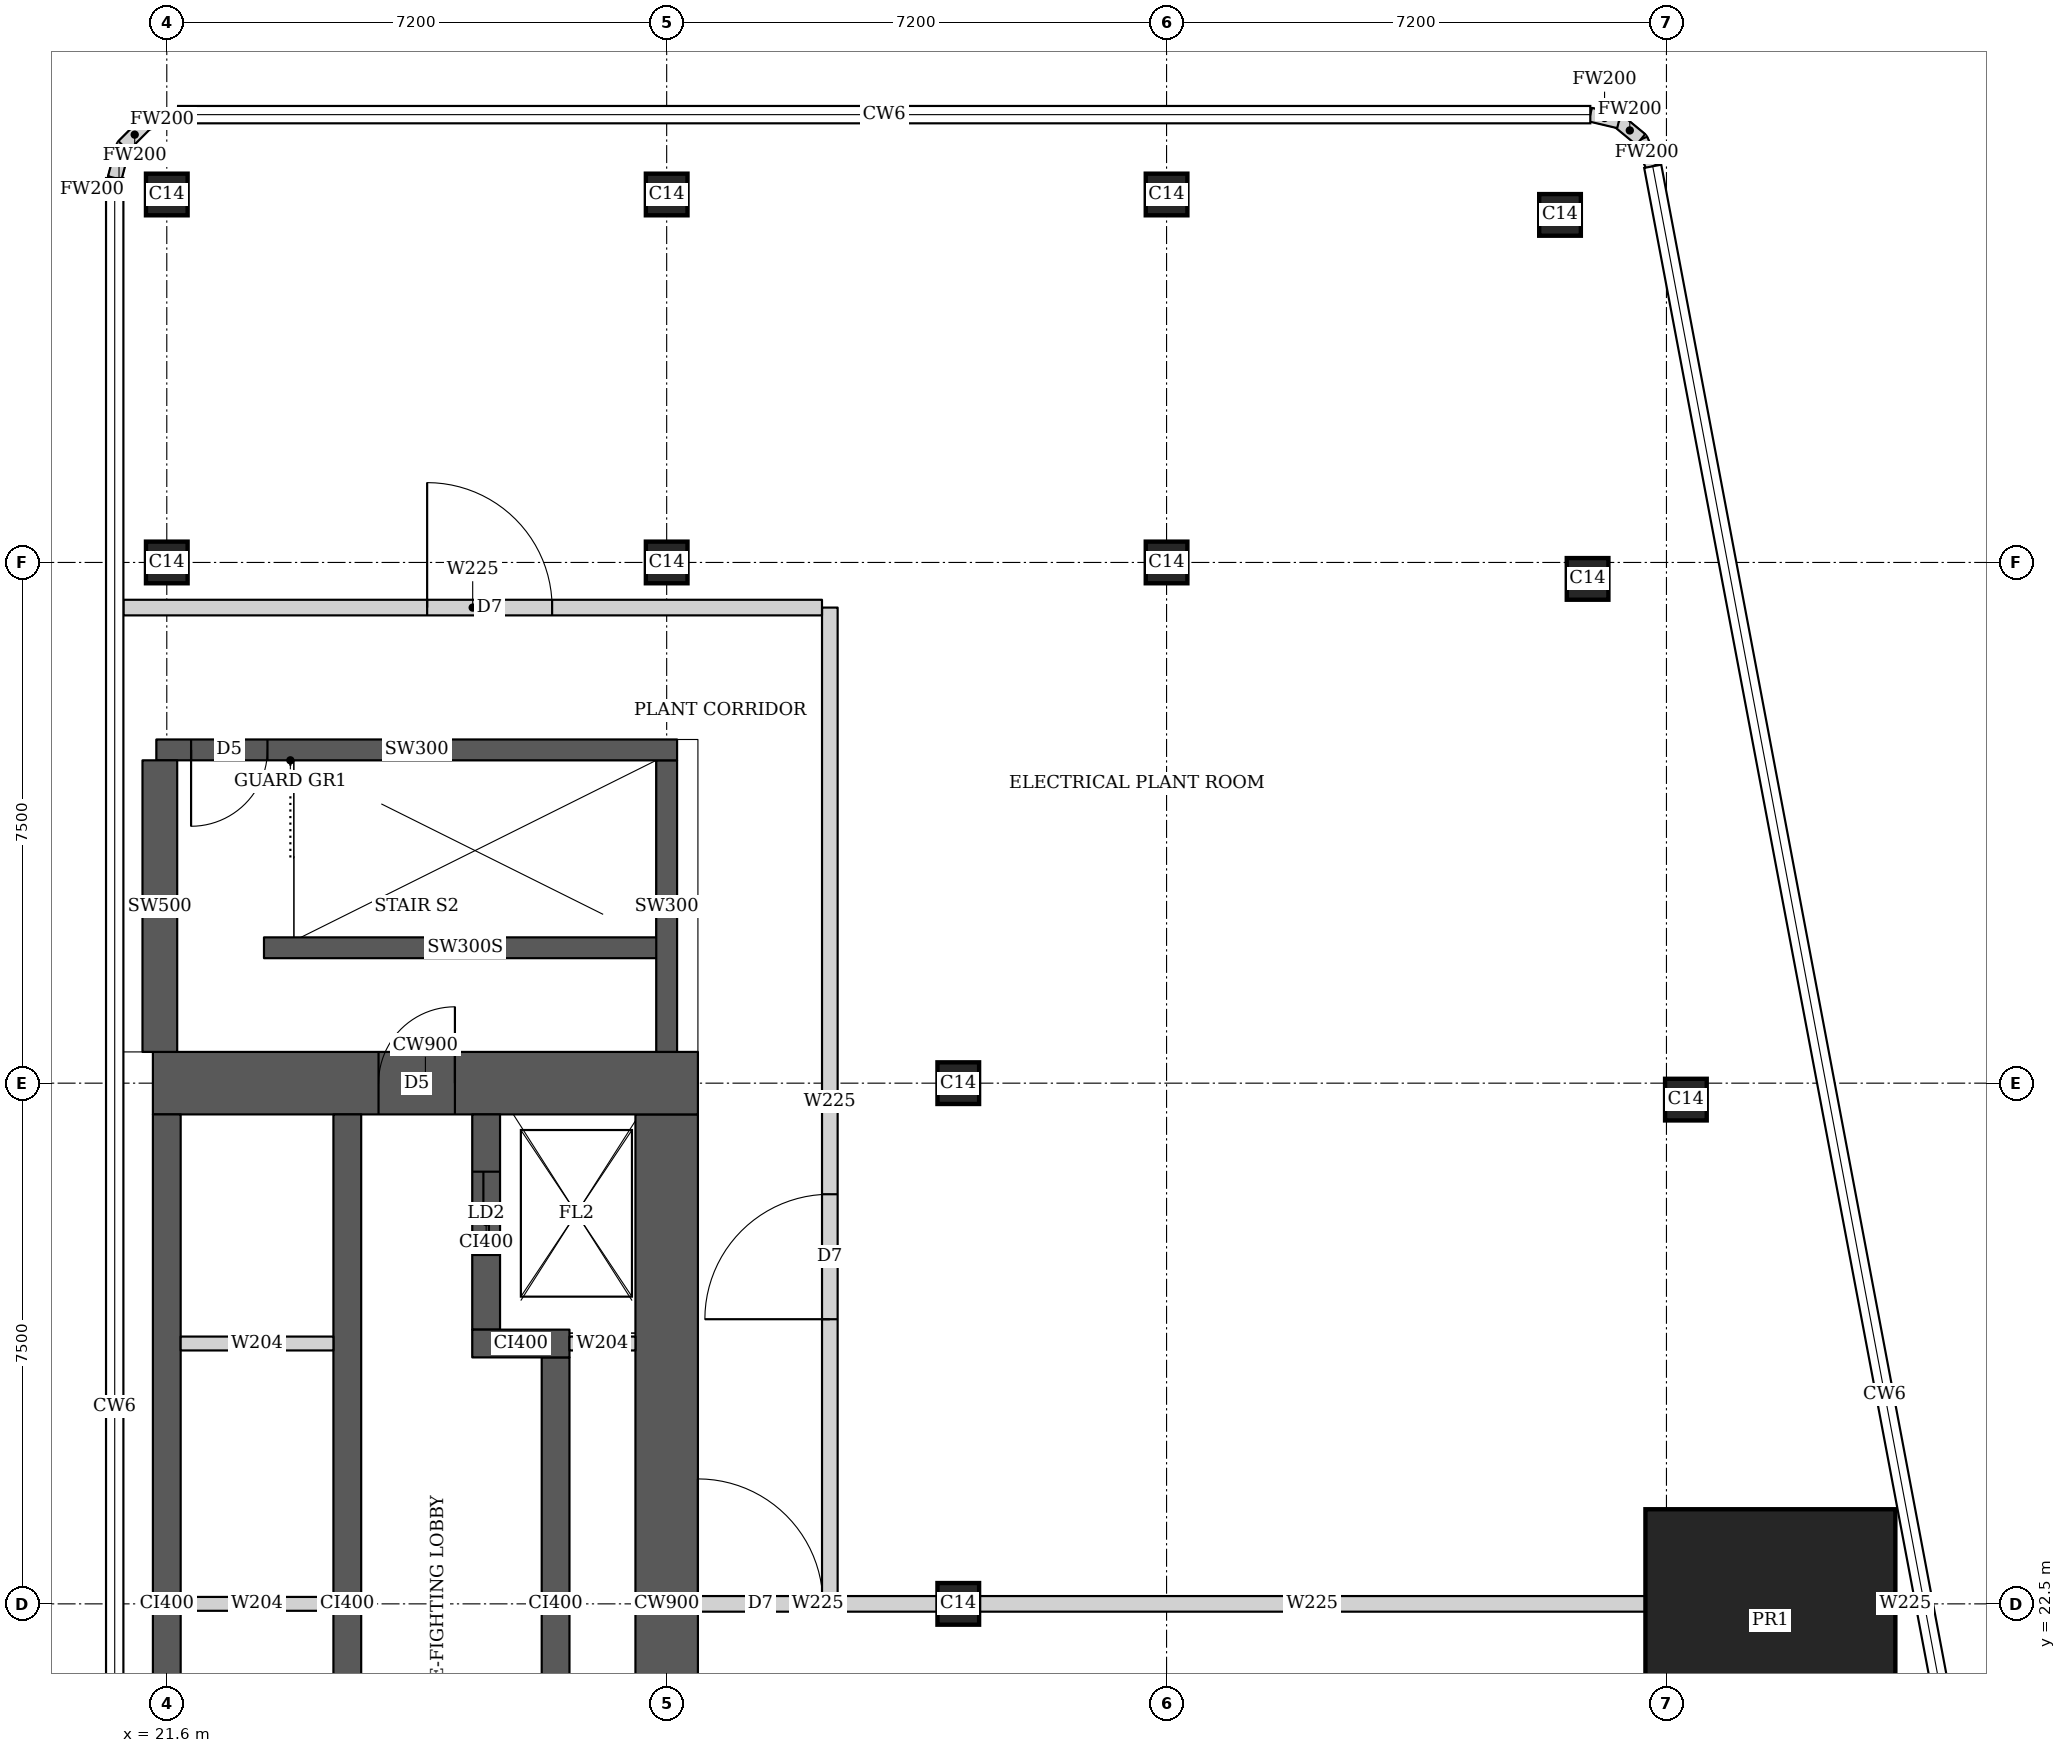
"""IFC4 building model, lengths in metres.
Left out: names, types, materials, properties, quantities, classifications, styles, units other than length and angle.
Written with IfcOpenShell. Run it as: python <this file> out.ifc"""

import sys

from ifc_helpers import new_model, si_unit, direction, frame, frame_2d, origin, origin_2d, place, context, subcontext, project, spatial, rectangle, extrude, element, fill, save


model = new_model("IFC4")
c1 = context("Model", 3, precision=1e-05, world=origin(), true_north=direction((0.0, 1.0)))
c2 = subcontext(c1, "Body", "Model", "MODEL_VIEW")
j1 = project(units=[si_unit("LENGTHUNIT", "METRE"), si_unit("PLANEANGLEUNIT", "RADIAN")], contexts=[c1])
p1 = place(None, origin())
s1 = spatial("IfcSite", under=j1, at=p1, CompositionType="ELEMENT")
p2 = place(p1, origin())
s2 = spatial("IfcBuilding", under=s1, at=p2, CompositionType="ELEMENT")
p3 = place(p2, frame((0.0, 0.0, 301.6)))
s3 = spatial("IfcBuildingStorey", under=s2, at=p3, CompositionType="ELEMENT", Elevation=301.6)
p4 = place(p3, frame((33.0, 22.5, 0.0), z_axis=(0.0, 0.0, 1.0), x_axis=(1.0, 0.0, 0.0)))
e1 = element("IfcColumn", 1, at=p4, inside=s3, PredefinedType="COLUMN", context=c2, shape_type="SweptSolid", body=[
    extrude(rectangle(XDim=0.6, YDim=0.6, at=origin_2d()), origin(), (0.0, 0.0, 1.0), 5.6),
])
p5 = place(p3, frame((44.697, 22.263, 0.0), z_axis=(0.0, 0.0, 1.0), x_axis=(1.0, 0.0, 0.0)))
e2 = element("IfcColumn", 2, at=p5, inside=s3, PredefinedType="COLUMN", context=c2, shape_type="SweptSolid", body=[
    extrude(rectangle(XDim=3.6, YDim=3.2, at=origin_2d()), origin(), (0.0, 0.0, 1.0), 5.6),
])
for number, where, z_axis, x_axis in (
    (3, (33.0, 30.0, 0.0), (0.0, 0.0, 1.0), (1.0, 0.0, 0.0)),
    (4, (43.48, 29.763, 0.0), (0.0, 0.0, 1.0), (1.0, 0.0, 0.0)),
    (5, (21.6, 37.5, 0.0), (0.0, 0.0, 1.0), (1.0, 0.0, 0.0)),
    (6, (28.8, 37.5, 0.0), (0.0, 0.0, 1.0), (1.0, 0.0, 0.0)),
    (7, (36.0, 37.5, 0.0), (0.0, 0.0, 1.0), (1.0, 0.0, 0.0)),
    (8, (42.064, 37.263, 0.0), (0.0, 0.0, 1.0), (1.0, 0.0, 0.0)),
    (9, (21.6, 42.8, 0.0), (0.0, 0.0, 1.0), (1.0, 0.0, 0.0)),
    (10, (28.8, 42.8, 0.0), (0.0, 0.0, 1.0), (1.0, 0.0, 0.0)),
    (11, (36.0, 42.8, 0.0), (0.0, 0.0, 1.0), (1.0, 0.0, 0.0)),
    (12, (41.667, 42.506, 0.0), (0.0, 0.0, 1.0), (1.0, 0.0, 0.0)),
):
    element("IfcColumn", number, at=place(p3, frame(where, z_axis=z_axis, x_axis=x_axis)), inside=s3, PredefinedType="COLUMN", context=c2, shape_type="SweptSolid", body=[
        extrude(rectangle(XDim=0.6, YDim=0.6, at=origin_2d()), origin(), (0.0, 0.0, 1.0), 5.6),
    ])
p6 = place(p3, frame((21.4, 30.0, 0.0), z_axis=(0.0, 0.0, 1.0), x_axis=(1.0, 0.0, 0.0)))
e13 = element("IfcWall", 13, at=p6, inside=s3, PredefinedType="SHEAR", context=c2, shape_type="SweptSolid", body=[
    extrude(rectangle(XDim=7.85, YDim=0.9, at=frame_2d((3.925, 0.0))), origin(), (0.0, 0.0, 1.0), 5.6),
])
p7 = place(p6, frame((3.25, 0.0, 0.0)))
e14 = element("IfcOpeningElement", 14, at=p7, cuts=e13, PredefinedType="OPENING", context=c2, shape_type="SweptSolid", body=[
    extrude(rectangle(XDim=1.1, YDim=2.1, at=frame_2d((0.55, 1.05))), frame((0.0, 0.46, 0.0), z_axis=(0.0, -1.0, 0.0), x_axis=(1.0, 0.0, 0.0)), (0.0, 0.0, 1.0), 0.92),
])
p8 = place(p3, frame((28.8, 15.45, 0.0), z_axis=(0.0, 0.0, 1.0), x_axis=(0.0, 1.0, 0.0)))
e15 = element("IfcWall", 15, at=p8, inside=s3, PredefinedType="SHEAR", context=c2, shape_type="SweptSolid", body=[
    extrude(rectangle(XDim=14.1, YDim=0.9, at=frame_2d((7.05, 0.0))), origin(), (0.0, 0.0, 1.0), 5.6),
])
for number, where, z_axis, x_axis in (
    (16, (21.6, 15.45, 0.0), (0.0, 0.0, 1.0), (0.0, 1.0, 0.0)),
    (17, (24.2, 15.45, 0.0), (0.0, 0.0, 1.0), (0.0, 1.0, 0.0)),
):
    element("IfcWall", number, at=place(p3, frame(where, z_axis=z_axis, x_axis=x_axis)), inside=s3, PredefinedType="SHEAR", context=c2, shape_type="SweptSolid", body=[
        extrude(rectangle(XDim=14.1, YDim=0.4, at=frame_2d((7.05, 0.0))), origin(), (0.0, 0.0, 1.0), 5.6),
    ])
p9 = place(p3, frame((27.2, 18.95, 0.0), z_axis=(0.0, 0.0, 1.0), x_axis=(0.0, 1.0, 0.0)))
e18 = element("IfcWall", 18, at=p9, inside=s3, PredefinedType="SHEAR", context=c2, shape_type="SweptSolid", body=[
    extrude(rectangle(XDim=7.1, YDim=0.4, at=frame_2d((3.55, 0.0))), origin(), (0.0, 0.0, 1.0), 5.6),
])
p10 = place(p3, frame((26.0, 26.25, 0.0), z_axis=(0.0, 0.0, 1.0), x_axis=(1.0, 0.0, 0.0)))
e19 = element("IfcWall", 19, at=p10, inside=s3, PredefinedType="SHEAR", context=c2, shape_type="SweptSolid", body=[
    extrude(rectangle(XDim=1.4, YDim=0.4, at=frame_2d((0.7, 0.0))), origin(), (0.0, 0.0, 1.0), 5.6),
])
p11 = place(p3, frame((26.2, 26.45, 0.0), z_axis=(0.0, 0.0, 1.0), x_axis=(0.0, 1.0, 0.0)))
e20 = element("IfcWall", 20, at=p11, inside=s3, PredefinedType="SHEAR", context=c2, shape_type="SweptSolid", body=[
    extrude(rectangle(XDim=3.1, YDim=0.4, at=frame_2d((1.55, 0.0))), origin(), (0.0, 0.0, 1.0), 5.6),
])
p12 = place(p11, frame((1.075, 0.0, 0.0)))
e21 = element("IfcOpeningElement", 21, at=p12, cuts=e20, PredefinedType="OPENING", context=c2, shape_type="SweptSolid", body=[
    extrude(rectangle(XDim=1.2, YDim=2.1, at=frame_2d((0.6, 1.05))), frame((0.0, 0.21, 0.0), z_axis=(0.0, -1.0, 0.0), x_axis=(1.0, 0.0, 0.0)), (0.0, 0.0, 1.0), 0.42),
])
p13 = place(p3, frame((21.45, 34.8, 0.0), z_axis=(0.0, 0.0, 1.0), x_axis=(1.0, 0.0, 0.0)))
e22 = element("IfcWall", 22, at=p13, inside=s3, PredefinedType="SHEAR", context=c2, shape_type="SweptSolid", body=[
    extrude(rectangle(XDim=7.5, YDim=0.3, at=frame_2d((3.75, 0.0))), origin(), (0.0, 0.0, 1.0), 5.6),
])
p14 = place(p13, frame((0.5, 0.0, 0.0)))
e23 = element("IfcOpeningElement", 23, at=p14, cuts=e22, PredefinedType="OPENING", context=c2, shape_type="SweptSolid", body=[
    extrude(rectangle(XDim=1.1, YDim=2.1, at=frame_2d((0.55, 1.05))), frame((0.0, 0.16, 0.0), z_axis=(0.0, -1.0, 0.0), x_axis=(1.0, 0.0, 0.0)), (0.0, 0.0, 1.0), 0.32),
])
p15 = place(p3, frame((21.5, 30.45, 0.0), z_axis=(0.0, 0.0, 1.0), x_axis=(0.0, 1.0, 0.0)))
e24 = element("IfcWall", 24, at=p15, inside=s3, PredefinedType="SHEAR", context=c2, shape_type="SweptSolid", body=[
    extrude(rectangle(XDim=4.2, YDim=0.5, at=frame_2d((2.1, 0.0))), origin(), (0.0, 0.0, 1.0), 5.6),
])
p16 = place(p3, frame((28.8, 30.45, 0.0), z_axis=(0.0, 0.0, 1.0), x_axis=(0.0, 1.0, 0.0)))
e25 = element("IfcWall", 25, at=p16, inside=s3, PredefinedType="SHEAR", context=c2, shape_type="SweptSolid", body=[
    extrude(rectangle(XDim=4.2, YDim=0.3, at=frame_2d((2.1, 0.0))), origin(), (0.0, 0.0, 1.0), 5.6),
])
p17 = place(p3, frame((43.002, 43.206, 0.0), z_axis=(0.0, 0.0, 1.0), x_axis=(-0.40678170573, 0.913525393124, 0.0)))
e26 = element("IfcWall", 26, at=p17, inside=s3, PredefinedType="SOLIDWALL", context=c2, shape_type="SweptSolid", body=[
    extrude(rectangle(XDim=0.423, YDim=0.2, at=frame_2d((0.211, 0.0))), origin(), (0.0, 0.0, 1.0), 5.35),
])
p18 = place(p3, frame((42.83, 43.592, 0.0), z_axis=(0.0, 0.0, 1.0), x_axis=(-0.771190539797, 0.636604391539, 0.0)))
e27 = element("IfcWall", 27, at=p18, inside=s3, PredefinedType="SOLIDWALL", context=c2, shape_type="SweptSolid", body=[
    extrude(rectangle(XDim=0.41, YDim=0.2, at=frame_2d((0.205, 0.0))), origin(), (0.0, 0.0, 1.0), 5.35),
])
p19 = place(p3, frame((42.514, 43.853, 0.0), z_axis=(0.0, 0.0, 1.0), x_axis=(-0.973288080424, 0.229587265555, 0.0)))
e28 = element("IfcWall", 28, at=p19, inside=s3, PredefinedType="SOLIDWALL", context=c2, shape_type="SweptSolid", body=[
    extrude(rectangle(XDim=0.422, YDim=0.2, at=frame_2d((0.211, 0.0))), origin(), (0.0, 0.0, 1.0), 5.35),
])
p20 = place(p3, frame((21.763, 43.95, 0.0), z_axis=(0.0, 0.0, 1.0), x_axis=(-0.965655254015, -0.259826731483, 0.0)))
e29 = element("IfcWall", 29, at=p20, inside=s3, PredefinedType="SOLIDWALL", context=c2, shape_type="SweptSolid", body=[
    extrude(rectangle(XDim=0.477, YDim=0.2, at=frame_2d((0.239, 0.0))), origin(), (0.0, 0.0, 1.0), 5.35),
])
p21 = place(p3, frame((21.302, 43.826, 0.0), z_axis=(0.0, 0.0, 1.0), x_axis=(-0.707106781187, -0.707106781187, 0.0)))
e30 = element("IfcWall", 30, at=p21, inside=s3, PredefinedType="SOLIDWALL", context=c2, shape_type="SweptSolid", body=[
    extrude(rectangle(XDim=0.464, YDim=0.2, at=frame_2d((0.232, 0.0))), origin(), (0.0, 0.0, 1.0), 5.35),
])
p22 = place(p3, frame((20.974, 43.498, 0.0), z_axis=(0.0, 0.0, 1.0), x_axis=(-0.259826731483, -0.965655254015, 0.0)))
e31 = element("IfcWall", 31, at=p22, inside=s3, PredefinedType="SOLIDWALL", context=c2, shape_type="SweptSolid", body=[
    extrude(rectangle(XDim=0.477, YDim=0.2, at=frame_2d((0.239, 0.0))), origin(), (0.0, 0.0, 1.0), 5.35),
])
p23 = place(p3, frame((29.25, 22.5, 0.0), z_axis=(0.0, 0.0, 1.0), x_axis=(1.0, 0.0, 0.0)))
e32 = element("IfcWall", 32, at=p23, inside=s3, PredefinedType="SOLIDWALL", context=c2, shape_type="SweptSolid", body=[
    extrude(rectangle(XDim=3.449, YDim=0.225, at=frame_2d((1.725, 0.0))), origin(), (0.0, 0.0, 1.0), 5.35),
])
p24 = place(p23, origin())
e33 = element("IfcOpeningElement", 33, at=p24, cuts=e32, PredefinedType="OPENING", context=c2, shape_type="SweptSolid", body=[
    extrude(rectangle(XDim=1.8, YDim=2.4, at=frame_2d((0.9, 1.2))), frame((0.0, 0.123, 0.0), z_axis=(0.0, -1.0, 0.0), x_axis=(1.0, 0.0, 0.0)), (0.0, 0.0, 1.0), 0.245),
])
p25 = place(p3, frame((33.301, 22.5, 0.0), z_axis=(0.0, 0.0, 1.0), x_axis=(1.0, 0.0, 0.0)))
e34 = element("IfcWall", 34, at=p25, inside=s3, PredefinedType="SOLIDWALL", context=c2, shape_type="SweptSolid", body=[
    extrude(rectangle(XDim=9.595, YDim=0.225, at=frame_2d((4.797, 0.0))), origin(), (0.0, 0.0, 1.0), 4.35),
])
p26 = place(p3, frame((46.498, 22.5, 0.0), z_axis=(0.0, 0.0, 1.0), x_axis=(1.0, 0.0, 0.0)))
e35 = element("IfcWall", 35, at=p26, inside=s3, PredefinedType="SOLIDWALL", context=c2, shape_type="SweptSolid", body=[
    extrude(rectangle(XDim=0.288, YDim=0.225, at=frame_2d((0.144, 0.0))), origin(), (0.0, 0.0, 1.0), 5.35),
])
p27 = place(p3, frame((20.975, 36.85, 0.0), z_axis=(0.0, 0.0, 1.0), x_axis=(1.0, 0.0, 0.0)))
e36 = element("IfcWall", 36, at=p27, inside=s3, PredefinedType="SOLIDWALL", context=c2, shape_type="SweptSolid", body=[
    extrude(rectangle(XDim=10.062, YDim=0.225, at=frame_2d((5.031, 0.0))), origin(), (0.0, 0.0, 1.0), 5.35),
])
p28 = place(p27, frame((4.375, 0.0, 0.0)))
e37 = element("IfcOpeningElement", 37, at=p28, cuts=e36, PredefinedType="OPENING", context=c2, shape_type="SweptSolid", body=[
    extrude(rectangle(XDim=1.8, YDim=2.4, at=frame_2d((0.9, 1.2))), frame((0.0, 0.123, 0.0), z_axis=(0.0, -1.0, 0.0), x_axis=(1.0, 0.0, 0.0)), (0.0, 0.0, 1.0), 0.245),
])
p29 = place(p3, frame((31.15, 22.613, 0.0), z_axis=(0.0, 0.0, 1.0), x_axis=(0.0, 1.0, 0.0)))
e38 = element("IfcWall", 38, at=p29, inside=s3, PredefinedType="SOLIDWALL", context=c2, shape_type="SweptSolid", body=[
    extrude(rectangle(XDim=14.237, YDim=0.225, at=frame_2d((7.119, 0.0))), origin(), (0.0, 0.0, 1.0), 5.35),
])
p30 = place(p29, frame((3.987, 0.0, 0.0)))
e39 = element("IfcOpeningElement", 39, at=p30, cuts=e38, PredefinedType="OPENING", context=c2, shape_type="SweptSolid", body=[
    extrude(rectangle(XDim=1.8, YDim=2.4, at=frame_2d((0.9, 1.2))), frame((0.0, 0.123, 0.0), z_axis=(0.0, -1.0, 0.0), x_axis=(1.0, 0.0, 0.0)), (0.0, 0.0, 1.0), 0.245),
])
p31 = place(p3, frame((23.0, 31.95, 0.0), z_axis=(0.0, 0.0, 1.0), x_axis=(1.0, 0.0, 0.0)))
e40 = element("IfcWall", 40, at=p31, inside=s3, PredefinedType="SHEAR", context=c2, shape_type="SweptSolid", body=[
    extrude(rectangle(XDim=5.8, YDim=0.3, at=frame_2d((2.9, 0.0))), origin(), (0.0, 0.0, 1.0), 5.35),
])
for number, where, z_axis, x_axis in (
    (41, (21.8, 22.5, 0.0), (0.0, 0.0, 1.0), (1.0, 0.0, 0.0)),
    (42, (21.8, 26.25, 0.0), (0.0, 0.0, 1.0), (1.0, 0.0, 0.0)),
):
    element("IfcWall", number, at=place(p3, frame(where, z_axis=z_axis, x_axis=x_axis)), inside=s3, PredefinedType="SOLIDWALL", context=c2, shape_type="SweptSolid", body=[
        extrude(rectangle(XDim=2.2, YDim=0.2, at=frame_2d((1.1, 0.0))), origin(), (0.0, 0.0, 1.0), 5.35),
    ])
p32 = place(p3, frame((27.4, 26.25, 0.0), z_axis=(0.0, 0.0, 1.0), x_axis=(1.0, 0.0, 0.0)))
e43 = element("IfcWall", 43, at=p32, inside=s3, PredefinedType="SOLIDWALL", context=c2, shape_type="SweptSolid", body=[
    extrude(rectangle(XDim=0.95, YDim=0.2, at=frame_2d((0.475, 0.0))), origin(), (0.0, 0.0, 1.0), 5.35),
])
p33 = place(p24, origin())
e44 = element("IfcDoor", 44, at=p33, inside=s3, OperationType="DOUBLE_DOOR_SINGLE_SWING", PredefinedType="DOOR", context=c2, shape_type="SweptSolid", body=[
    extrude(rectangle(XDim=1.8, YDim=2.4, at=frame_2d((0.9, 1.2))), frame((0.0, 0.025, 0.0), z_axis=(0.0, -1.0, 0.0), x_axis=(1.0, 0.0, 0.0)), (0.0, 0.0, 1.0), 0.05),
])
fill(e33, e44)
p34 = place(p30, origin())
e45 = element("IfcDoor", 45, at=p34, inside=s3, OperationType="DOUBLE_DOOR_SINGLE_SWING", PredefinedType="DOOR", context=c2, shape_type="SweptSolid", body=[
    extrude(rectangle(XDim=1.8, YDim=2.4, at=frame_2d((0.9, 1.2))), frame((0.0, 0.025, 0.0), z_axis=(0.0, -1.0, 0.0), x_axis=(1.0, 0.0, 0.0)), (0.0, 0.0, 1.0), 0.05),
])
fill(e39, e45)
p35 = place(p28, origin())
e46 = element("IfcDoor", 46, at=p35, inside=s3, OperationType="DOUBLE_DOOR_SINGLE_SWING", PredefinedType="DOOR", context=c2, shape_type="SweptSolid", body=[
    extrude(rectangle(XDim=1.8, YDim=2.4, at=frame_2d((0.9, 1.2))), frame((0.0, 0.025, 0.0), z_axis=(0.0, -1.0, 0.0), x_axis=(1.0, 0.0, 0.0)), (0.0, 0.0, 1.0), 0.05),
])
fill(e37, e46)
p36 = place(p7, origin())
e47 = element("IfcDoor", 47, at=p36, inside=s3, OperationType="SINGLE_SWING_RIGHT", PredefinedType="DOOR", context=c2, shape_type="SweptSolid", body=[
    extrude(rectangle(XDim=1.1, YDim=2.1, at=frame_2d((0.55, 1.05))), frame((0.0, 0.025, 0.0), z_axis=(0.0, -1.0, 0.0), x_axis=(1.0, 0.0, 0.0)), (0.0, 0.0, 1.0), 0.05),
])
fill(e14, e47)
p37 = place(p12, origin())
e48 = element("IfcDoor", 48, at=p37, inside=s3, OperationType="DOUBLE_DOOR_SLIDING", PredefinedType="DOOR", context=c2, shape_type="SweptSolid", body=[
    extrude(rectangle(XDim=1.2, YDim=2.1, at=frame_2d((0.6, 1.05))), frame((0.0, 0.025, 0.0), z_axis=(0.0, -1.0, 0.0), x_axis=(1.0, 0.0, 0.0)), (0.0, 0.0, 1.0), 0.05),
])
fill(e21, e48)
p38 = place(p14, origin())
e49 = element("IfcDoor", 49, at=p38, inside=s3, OperationType="SINGLE_SWING_RIGHT", PredefinedType="DOOR", context=c2, shape_type="SweptSolid", body=[
    extrude(rectangle(XDim=1.1, YDim=2.1, at=frame_2d((0.55, 1.05))), frame((0.0, 0.025, 0.0), z_axis=(0.0, -1.0, 0.0), x_axis=(1.0, 0.0, 0.0)), (0.0, 0.0, 1.0), 0.05),
])
fill(e23, e49)
save(model, sys.argv[1])
